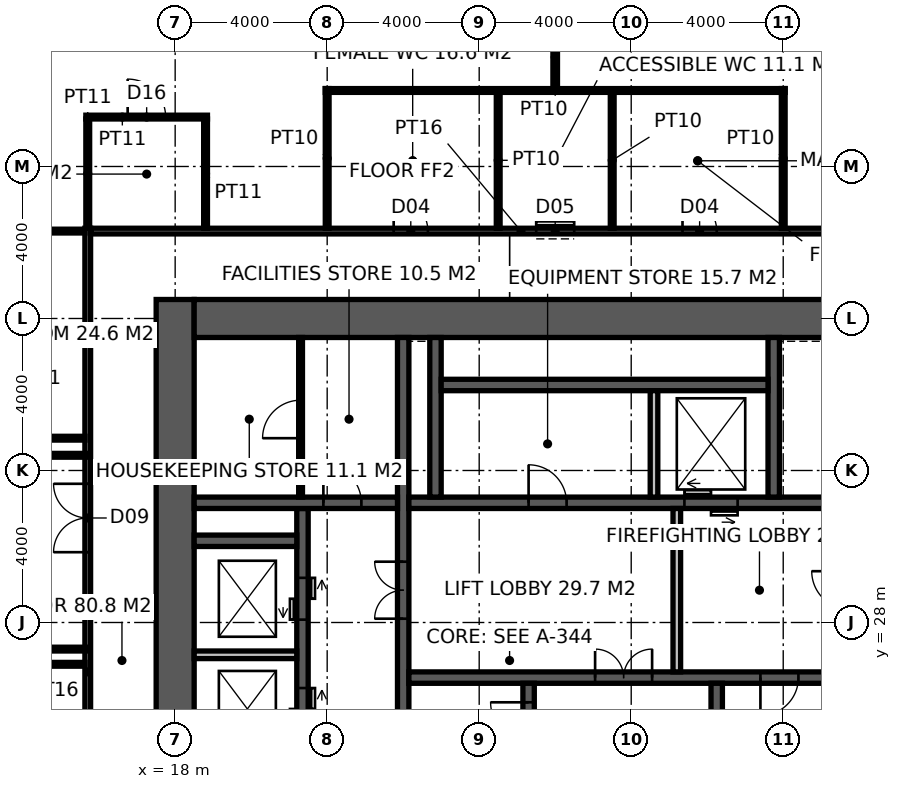
"""IFC4 building model, lengths in metres.
Left out: names, types, materials, properties, quantities, classifications, styles, units other than length and angle.
Written with IfcOpenShell. Run it as: python <this file> out.ifc"""

import sys

from ifc_helpers import new_model, si_unit, direction, frame, frame_2d, origin, place, context, subcontext, project, spatial, rectangle, extrude, element, fill, save


model = new_model("IFC4")
c1 = context("Model", 3, precision=1e-05, world=origin(), true_north=direction((0.0, 1.0)))
c2 = subcontext(c1, "Body", "Model", "MODEL_VIEW")
j1 = project(units=[si_unit("LENGTHUNIT", "METRE"), si_unit("PLANEANGLEUNIT", "RADIAN")], contexts=[c1])
p1 = place(None, origin())
s1 = spatial("IfcSite", under=j1, at=p1, CompositionType="ELEMENT")
p2 = place(p1, origin())
s2 = spatial("IfcBuilding", under=s1, at=p2, CompositionType="ELEMENT")
p3 = place(p2, frame((0.0, 0.0, 286.2)))
s3 = spatial("IfcBuildingStorey", under=s2, at=p3, CompositionType="ELEMENT", Elevation=286.2)
p4 = place(p3, frame((18.0, 17.5, -0.15), z_axis=(0.0, 0.0, 1.0), x_axis=(0.0, 1.0, 0.0)))
e1 = element("IfcWall", 1, at=p4, inside=s3, PredefinedType="SHEAR", context=c2, shape_type="SweptSolid", body=[
    extrude(rectangle(XDim=19.0, YDim=1.0, at=frame_2d((9.5, 0.0))), origin(), (0.0, 0.0, 1.0), 4.0),
])
p5 = place(p3, frame((18.5, 36.0, -0.15), z_axis=(0.0, 0.0, 1.0), x_axis=(1.0, 0.0, 0.0)))
e2 = element("IfcWall", 2, at=p5, inside=s3, PredefinedType="SHEAR", context=c2, shape_type="SweptSolid", body=[
    extrude(rectangle(XDim=17.6, YDim=1.0, at=frame_2d((8.8, 0.0))), origin(), (0.0, 0.0, 1.0), 4.0),
])
p6 = place(p3, frame((24.0, 18.5, -0.15), z_axis=(0.0, 0.0, 1.0), x_axis=(0.0, 1.0, 0.0)))
e3 = element("IfcWall", 3, at=p6, inside=s3, PredefinedType="SHEAR", context=c2, shape_type="SweptSolid", body=[
    extrude(rectangle(XDim=17.0, YDim=0.3, at=frame_2d((8.5, 0.0))), origin(), (0.0, 0.0, 1.0), 4.0),
])
p7 = place(p6, frame((9.6, 0.0, 0.15)))
e4 = element("IfcOpeningElement", 4, at=p7, cuts=e3, PredefinedType="OPENING", context=c2, shape_type="SweptSolid", body=[
    extrude(rectangle(XDim=1.5, YDim=2.4, at=frame_2d((0.75, 1.2))), frame((0.0, 0.16, 0.0), z_axis=(0.0, -1.0, 0.0), x_axis=(1.0, 0.0, 0.0)), (0.0, 0.0, 1.0), 0.32),
])
p8 = place(p3, frame((24.15, 26.55, -0.15), z_axis=(0.0, 0.0, 1.0), x_axis=(1.0, 0.0, 0.0)))
e5 = element("IfcWall", 5, at=p8, inside=s3, PredefinedType="SHEAR", context=c2, shape_type="SweptSolid", body=[
    extrude(rectangle(XDim=11.25, YDim=0.3, at=frame_2d((5.625, 0.0))), origin(), (0.0, 0.0, 1.0), 4.0),
])
p9 = place(p8, frame((9.25, 0.0, 0.15)))
e6 = element("IfcOpeningElement", 6, at=p9, cuts=e5, PredefinedType="OPENING", context=c2, shape_type="SweptSolid", body=[
    extrude(rectangle(XDim=1.0, YDim=2.2, at=frame_2d((0.5, 1.1))), frame((0.0, 0.16, 0.0), z_axis=(0.0, -1.0, 0.0), x_axis=(1.0, 0.0, 0.0)), (0.0, 0.0, 1.0), 0.32),
])
p10 = place(p8, frame((4.9, 0.0, 0.15)))
e7 = element("IfcOpeningElement", 7, at=p10, cuts=e5, PredefinedType="OPENING", context=c2, shape_type="SweptSolid", body=[
    extrude(rectangle(XDim=1.5, YDim=2.4, at=frame_2d((0.75, 1.2))), frame((0.0, 0.16, 0.0), z_axis=(0.0, -1.0, 0.0), x_axis=(1.0, 0.0, 0.0)), (0.0, 0.0, 1.0), 0.32),
])
p11 = place(p3, frame((27.3, 18.5, -0.15), z_axis=(0.0, 0.0, 1.0), x_axis=(0.0, 1.0, 0.0)))
e8 = element("IfcWall", 8, at=p11, inside=s3, PredefinedType="SHEAR", context=c2, shape_type="SweptSolid", body=[
    extrude(rectangle(XDim=7.9, YDim=0.3, at=frame_2d((3.95, 0.0))), origin(), (0.0, 0.0, 1.0), 4.0),
])
p12 = place(p11, frame((6.4, 0.0, 0.15)))
e9 = element("IfcOpeningElement", 9, at=p12, cuts=e8, PredefinedType="OPENING", context=c2, shape_type="SweptSolid", body=[
    extrude(rectangle(XDim=1.0, YDim=2.2, at=frame_2d((0.5, 1.1))), frame((0.0, 0.16, 0.0), z_axis=(0.0, -1.0, 0.0), x_axis=(1.0, 0.0, 0.0)), (0.0, 0.0, 1.0), 0.32),
])
p13 = place(p3, frame((32.25, 18.5, -0.15), z_axis=(0.0, 0.0, 1.0), x_axis=(0.0, 1.0, 0.0)))
e10 = element("IfcWall", 10, at=p13, inside=s3, PredefinedType="SHEAR", context=c2, shape_type="SweptSolid", body=[
    extrude(rectangle(XDim=7.9, YDim=0.3, at=frame_2d((3.95, 0.0))), origin(), (0.0, 0.0, 1.0), 4.0),
])
p14 = place(p3, frame((24.15, 31.15, -0.15), z_axis=(0.0, 0.0, 1.0), x_axis=(1.0, 0.0, 0.0)))
e11 = element("IfcWall", 11, at=p14, inside=s3, PredefinedType="SHEAR", context=c2, shape_type="SweptSolid", body=[
    extrude(rectangle(XDim=11.25, YDim=0.3, at=frame_2d((5.625, 0.0))), origin(), (0.0, 0.0, 1.0), 4.0),
])
p15 = place(p14, frame((3.15, 0.0, 0.15)))
e12 = element("IfcOpeningElement", 12, at=p15, cuts=e11, PredefinedType="OPENING", context=c2, shape_type="SweptSolid", body=[
    extrude(rectangle(XDim=1.0, YDim=2.2, at=frame_2d((0.5, 1.1))), frame((0.0, 0.16, 0.0), z_axis=(0.0, -1.0, 0.0), x_axis=(1.0, 0.0, 0.0)), (0.0, 0.0, 1.0), 0.32),
])
p16 = place(p14, frame((7.25, 0.0, 0.15)))
e13 = element("IfcOpeningElement", 13, at=p16, cuts=e11, PredefinedType="OPENING", context=c2, shape_type="SweptSolid", body=[
    extrude(rectangle(XDim=1.4, YDim=2.4, at=frame_2d((0.7, 1.2))), frame((0.0, 0.16, 0.0), z_axis=(0.0, -1.0, 0.0), x_axis=(1.0, 0.0, 0.0)), (0.0, 0.0, 1.0), 0.32),
])
p17 = place(p3, frame((21.35, 18.5, -0.15), z_axis=(0.0, 0.0, 1.0), x_axis=(0.0, 1.0, 0.0)))
e14 = element("IfcWall", 14, at=p17, inside=s3, PredefinedType="SHEAR", context=c2, shape_type="SweptSolid", body=[
    extrude(rectangle(XDim=12.5, YDim=0.3, at=frame_2d((6.25, 0.0))), origin(), (0.0, 0.0, 1.0), 4.0),
])
p18 = place(p17, frame((0.875, 0.0, 0.15)))
e15 = element("IfcOpeningElement", 15, at=p18, cuts=e14, PredefinedType="OPENING", context=c2, shape_type="SweptSolid", body=[
    extrude(rectangle(XDim=1.1, YDim=2.2, at=frame_2d((0.55, 1.1))), frame((0.0, 0.16, 0.0), z_axis=(0.0, -1.0, 0.0), x_axis=(1.0, 0.0, 0.0)), (0.0, 0.0, 1.0), 0.32),
])
p19 = place(p17, frame((3.825, 0.0, 0.15)))
e16 = element("IfcOpeningElement", 16, at=p19, cuts=e14, PredefinedType="OPENING", context=c2, shape_type="SweptSolid", body=[
    extrude(rectangle(XDim=1.1, YDim=2.2, at=frame_2d((0.55, 1.1))), frame((0.0, 0.16, 0.0), z_axis=(0.0, -1.0, 0.0), x_axis=(1.0, 0.0, 0.0)), (0.0, 0.0, 1.0), 0.32),
])
p20 = place(p17, frame((6.675, 0.0, 0.15)))
e17 = element("IfcOpeningElement", 17, at=p20, cuts=e14, PredefinedType="OPENING", context=c2, shape_type="SweptSolid", body=[
    extrude(rectangle(XDim=1.1, YDim=2.2, at=frame_2d((0.55, 1.1))), frame((0.0, 0.16, 0.0), z_axis=(0.0, -1.0, 0.0), x_axis=(1.0, 0.0, 0.0)), (0.0, 0.0, 1.0), 0.32),
])
p21 = place(p17, frame((9.575, 0.0, 0.15)))
e18 = element("IfcOpeningElement", 18, at=p21, cuts=e14, PredefinedType="OPENING", context=c2, shape_type="SweptSolid", body=[
    extrude(rectangle(XDim=1.1, YDim=2.2, at=frame_2d((0.55, 1.1))), frame((0.0, 0.16, 0.0), z_axis=(0.0, -1.0, 0.0), x_axis=(1.0, 0.0, 0.0)), (0.0, 0.0, 1.0), 0.32),
])
p22 = place(p3, frame((18.5, 31.15, -0.15), z_axis=(0.0, 0.0, 1.0), x_axis=(1.0, 0.0, 0.0)))
e19 = element("IfcWall", 19, at=p22, inside=s3, PredefinedType="SHEAR", context=c2, shape_type="SweptSolid", body=[
    extrude(rectangle(XDim=5.35, YDim=0.3, at=frame_2d((2.675, 0.0))), origin(), (0.0, 0.0, 1.0), 4.0),
])
p23 = place(p22, frame((3.4, 0.0, 0.15)))
e20 = element("IfcOpeningElement", 20, at=p23, cuts=e19, PredefinedType="OPENING", context=c2, shape_type="SweptSolid", body=[
    extrude(rectangle(XDim=1.0, YDim=2.2, at=frame_2d((0.5, 1.1))), frame((0.0, 0.16, 0.0), z_axis=(0.0, -1.0, 0.0), x_axis=(1.0, 0.0, 0.0)), (0.0, 0.0, 1.0), 0.32),
])
p24 = place(p3, frame((18.5, 30.15, -0.15), z_axis=(0.0, 0.0, 1.0), x_axis=(1.0, 0.0, 0.0)))
e21 = element("IfcWall", 21, at=p24, inside=s3, PredefinedType="SHEAR", context=c2, shape_type="SweptSolid", body=[
    extrude(rectangle(XDim=2.7, YDim=0.3, at=frame_2d((1.35, 0.0))), origin(), (0.0, 0.0, 1.0), 4.0),
])
for number, where, z_axis, x_axis in (
    (22, (24.85, 31.3, -0.15), (0.0, 0.0, 1.0), (0.0, 1.0, 0.0)),
    (23, (33.75, 31.3, -0.15), (0.0, 0.0, 1.0), (0.0, 1.0, 0.0)),
):
    element("IfcWall", number, at=place(p3, frame(where, z_axis=z_axis, x_axis=x_axis)), inside=s3, PredefinedType="SHEAR", context=c2, shape_type="SweptSolid", body=[
        extrude(rectangle(XDim=4.2, YDim=0.3, at=frame_2d((2.1, 0.0))), origin(), (0.0, 0.0, 1.0), 4.0),
    ])
p25 = place(p3, frame((25.0, 34.25, -0.15), z_axis=(0.0, 0.0, 1.0), x_axis=(1.0, 0.0, 0.0)))
e24 = element("IfcWall", 24, at=p25, inside=s3, PredefinedType="SHEAR", context=c2, shape_type="SweptSolid", body=[
    extrude(rectangle(XDim=8.6, YDim=0.3, at=frame_2d((4.3, 0.0))), origin(), (0.0, 0.0, 1.0), 4.0),
])
p26 = place(p3, frame((30.6, 31.3, -0.15), z_axis=(0.0, 0.0, 1.0), x_axis=(0.0, 1.0, 0.0)))
e25 = element("IfcWall", 25, at=p26, inside=s3, PredefinedType="SOLIDWALL", context=c2, shape_type="SweptSolid", body=[
    extrude(rectangle(XDim=2.8, YDim=0.2, at=frame_2d((1.4, 0.0))), origin(), (0.0, 0.0, 1.0), 4.0),
])
p27 = place(p3, frame((18.5, 27.15, -0.15), z_axis=(0.0, 0.0, 1.0), x_axis=(1.0, 0.0, 0.0)))
e26 = element("IfcWall", 26, at=p27, inside=s3, PredefinedType="SOLIDWALL", context=c2, shape_type="SweptSolid", body=[
    extrude(rectangle(XDim=2.7, YDim=0.2, at=frame_2d((1.35, 0.0))), origin(), (0.0, 0.0, 1.0), 4.0),
])
p28 = place(p3, frame((31.2, 26.7, 0.0), z_axis=(0.0, 0.0, 1.0), x_axis=(0.0, 1.0, 0.0)))
e27 = element("IfcWall", 27, at=p28, inside=s3, PredefinedType="SOLIDWALL", context=c2, shape_type="SweptSolid", body=[
    extrude(rectangle(XDim=4.3, YDim=0.2, at=frame_2d((2.15, 0.0))), origin(), (0.0, 0.0, 1.0), 3.85),
])
p29 = place(p3, frame((21.3, 31.3, 0.0), z_axis=(0.0, 0.0, 1.0), x_axis=(0.0, 1.0, 0.0)))
e28 = element("IfcWall", 28, at=p29, inside=s3, PredefinedType="PARTITIONING", context=c2, shape_type="SweptSolid", body=[
    extrude(rectangle(XDim=4.2, YDim=0.1, at=frame_2d((2.1, 0.0))), origin(), (0.0, 0.0, 1.0), 3.85),
])
p30 = place(p29, frame((1.55, 0.0, 0.0)))
e29 = element("IfcOpeningElement", 29, at=p30, cuts=e28, PredefinedType="OPENING", context=c2, shape_type="SweptSolid", body=[
    extrude(rectangle(XDim=1.0, YDim=2.2, at=frame_2d((0.5, 1.1))), frame((0.0, 0.06, 0.0), z_axis=(0.0, -1.0, 0.0), x_axis=(1.0, 0.0, 0.0)), (0.0, 0.0, 1.0), 0.12),
])
p31 = place(p3, frame((15.7, 15.025, 0.0), z_axis=(0.0, 0.0, 1.0), x_axis=(0.0, 1.0, 0.0)))
e30 = element("IfcWall", 30, at=p31, inside=s3, PredefinedType="PARTITIONING", context=c2, shape_type="SweptSolid", body=[
    extrude(rectangle(XDim=23.35, YDim=0.15, at=frame_2d((11.675, 0.0))), origin(), (0.0, 0.0, 1.0), 3.85),
])
p32 = place(p31, frame((3.275, 0.0, 0.0)))
e31 = element("IfcOpeningElement", 31, at=p32, cuts=e30, PredefinedType="OPENING", context=c2, shape_type="SweptSolid", body=[
    extrude(rectangle(XDim=1.8, YDim=2.4, at=frame_2d((0.9, 1.2))), frame((0.0, 0.085, 0.0), z_axis=(0.0, -1.0, 0.0), x_axis=(1.0, 0.0, 0.0)), (0.0, 0.0, 1.0), 0.17),
])
p33 = place(p31, frame((14.825, 0.0, 0.0)))
e32 = element("IfcOpeningElement", 32, at=p33, cuts=e30, PredefinedType="OPENING", context=c2, shape_type="SweptSolid", body=[
    extrude(rectangle(XDim=1.8, YDim=2.4, at=frame_2d((0.9, 1.2))), frame((0.0, 0.085, 0.0), z_axis=(0.0, -1.0, 0.0), x_axis=(1.0, 0.0, 0.0)), (0.0, 0.0, 1.0), 0.17),
])
p34 = place(p3, frame((15.775, 38.3, 0.0), z_axis=(0.0, 0.0, 1.0), x_axis=(1.0, 0.0, 0.0)))
e33 = element("IfcWall", 33, at=p34, inside=s3, PredefinedType="PARTITIONING", context=c2, shape_type="SweptSolid", body=[
    extrude(rectangle(XDim=22.65, YDim=0.15, at=frame_2d((11.325, 0.0))), origin(), (0.0, 0.0, 1.0), 3.85),
])
p35 = place(p34, frame((7.975, 0.0, 0.0)))
e34 = element("IfcOpeningElement", 34, at=p35, cuts=e33, PredefinedType="OPENING", context=c2, shape_type="SweptSolid", body=[
    extrude(rectangle(XDim=0.9, YDim=2.1, at=frame_2d((0.45, 1.05))), frame((0.0, 0.085, 0.0), z_axis=(0.0, -1.0, 0.0), x_axis=(1.0, 0.0, 0.0)), (0.0, 0.0, 1.0), 0.17),
])
p36 = place(p34, frame((11.725, 0.0, 0.0)))
e35 = element("IfcOpeningElement", 35, at=p36, cuts=e33, PredefinedType="OPENING", context=c2, shape_type="SweptSolid", body=[
    extrude(rectangle(XDim=1.0, YDim=2.1, at=frame_2d((0.5, 1.05))), frame((0.0, 0.085, 0.0), z_axis=(0.0, -1.0, 0.0), x_axis=(1.0, 0.0, 0.0)), (0.0, 0.0, 1.0), 0.17),
])
p37 = place(p34, frame((15.575, 0.0, 0.0)))
e36 = element("IfcOpeningElement", 36, at=p37, cuts=e33, PredefinedType="OPENING", context=c2, shape_type="SweptSolid", body=[
    extrude(rectangle(XDim=0.9, YDim=2.1, at=frame_2d((0.45, 1.05))), frame((0.0, 0.085, 0.0), z_axis=(0.0, -1.0, 0.0), x_axis=(1.0, 0.0, 0.0)), (0.0, 0.0, 1.0), 0.17),
])
for number, where, z_axis, x_axis in (
    (37, (22.0, 38.375, 0.0), (0.0, 0.0, 1.0), (0.0, 1.0, 0.0)),
    (38, (34.0, 38.375, 0.0), (0.0, 0.0, 1.0), (0.0, 1.0, 0.0)),
):
    element("IfcWall", number, at=place(p3, frame(where, z_axis=z_axis, x_axis=x_axis)), inside=s3, PredefinedType="PARTITIONING", context=c2, shape_type="SweptSolid", body=[
        extrude(rectangle(XDim=3.675, YDim=0.1, at=frame_2d((1.837, 0.0))), origin(), (0.0, 0.0, 1.0), 2.95),
    ])
p38 = place(p3, frame((21.95, 42.0, 0.0), z_axis=(0.0, 0.0, 1.0), x_axis=(1.0, 0.0, 0.0)))
e39 = element("IfcWall", 39, at=p38, inside=s3, PredefinedType="PARTITIONING", context=c2, shape_type="SweptSolid", body=[
    extrude(rectangle(XDim=12.1, YDim=0.1, at=frame_2d((6.05, 0.0))), origin(), (0.0, 0.0, 1.0), 3.85),
])
for number, where, z_axis, x_axis in (
    (40, (26.5, 38.375, 0.0), (0.0, 0.0, 1.0), (0.0, 1.0, 0.0)),
    (41, (29.5, 38.375, 0.0), (0.0, 0.0, 1.0), (0.0, 1.0, 0.0)),
):
    element("IfcWall", number, at=place(p3, frame(where, z_axis=z_axis, x_axis=x_axis)), inside=s3, PredefinedType="PARTITIONING", context=c2, shape_type="SweptSolid", body=[
        extrude(rectangle(XDim=3.575, YDim=0.1, at=frame_2d((1.788, 0.0))), origin(), (0.0, 0.0, 1.0), 3.85),
    ])
p39 = place(p3, frame((28.0, 42.05, 0.0), z_axis=(0.0, 0.0, 1.0), x_axis=(0.0, 1.0, 0.0)))
e42 = element("IfcWall", 42, at=p39, inside=s3, PredefinedType="PARTITIONING", context=c2, shape_type="SweptSolid", body=[
    extrude(rectangle(XDim=1.65, YDim=0.12, at=frame_2d((0.825, 0.0))), origin(), (0.0, 0.0, 1.0), 3.85),
])
for number, where, z_axis, x_axis in (
    (43, (10.85, 26.9, 0.0), (0.0, 0.0, 1.0), (1.0, 0.0, 0.0)),
    (44, (10.85, 32.85, 0.0), (0.0, 0.0, 1.0), (1.0, 0.0, 0.0)),
    (45, (10.85, 38.3, 0.0), (0.0, 0.0, 1.0), (1.0, 0.0, 0.0)),
):
    element("IfcWall", number, at=place(p3, frame(where, z_axis=z_axis, x_axis=x_axis)), inside=s3, PredefinedType="PARTITIONING", context=c2, shape_type="SweptSolid", body=[
        extrude(rectangle(XDim=4.775, YDim=0.1, at=frame_2d((2.387, 0.0))), origin(), (0.0, 0.0, 1.0), 3.85),
    ])
p40 = place(p3, frame((15.65, 41.3, 0.0), z_axis=(0.0, 0.0, 1.0), x_axis=(1.0, 0.0, 0.0)))
e46 = element("IfcWall", 46, at=p40, inside=s3, PredefinedType="PARTITIONING", context=c2, shape_type="SweptSolid", body=[
    extrude(rectangle(XDim=3.2, YDim=0.1, at=frame_2d((1.6, 0.0))), origin(), (0.0, 0.0, 1.0), 3.85),
])
p41 = place(p40, frame((1.1, 0.0, 0.0)))
e47 = element("IfcOpeningElement", 47, at=p41, cuts=e46, PredefinedType="OPENING", context=c2, shape_type="SweptSolid", body=[
    extrude(rectangle(XDim=1.0, YDim=2.2, at=frame_2d((0.5, 1.1))), frame((0.0, 0.06, 0.0), z_axis=(0.0, -1.0, 0.0), x_axis=(1.0, 0.0, 0.0)), (0.0, 0.0, 1.0), 0.12),
])
for number, where, z_axis, x_axis in (
    (48, (15.7, 38.375, 0.0), (0.0, 0.0, 1.0), (0.0, 1.0, 0.0)),
    (49, (18.8, 38.375, 0.0), (0.0, 0.0, 1.0), (0.0, 1.0, 0.0)),
):
    element("IfcWall", number, at=place(p3, frame(where, z_axis=z_axis, x_axis=x_axis)), inside=s3, PredefinedType="PARTITIONING", context=c2, shape_type="SweptSolid", body=[
        extrude(rectangle(XDim=2.875, YDim=0.1, at=frame_2d((1.438, 0.0))), origin(), (0.0, 0.0, 1.0), 3.85),
    ])
for number, where, z_axis, x_axis in (
    (50, (15.7, 32.4, 0.0), (0.0, 0.0, 1.0), (-1.0, 0.0, 0.0)),
    (51, (11.2, 27.3, 0.0), (0.0, 0.0, 1.0), (1.0, 0.0, 0.0)),
):
    element("IfcWall", number, at=place(p3, frame(where, z_axis=z_axis, x_axis=x_axis)), inside=s3, PredefinedType="PARTITIONING", context=c2, shape_type="SweptSolid", body=[
        extrude(rectangle(XDim=4.5, YDim=0.1, at=frame_2d((2.25, 0.0))), origin(), (0.0, 0.0, 1.0), 3.85),
    ])
p42 = place(p12, origin())
e52 = element("IfcDoor", 52, at=p42, inside=s3, OperationType="SINGLE_SWING_RIGHT", PredefinedType="DOOR", context=c2, shape_type="SweptSolid", body=[
    extrude(rectangle(XDim=1.0, YDim=2.2, at=frame_2d((0.5, 1.1))), frame((0.0, 0.025, 0.0), z_axis=(0.0, -1.0, 0.0), x_axis=(1.0, 0.0, 0.0)), (0.0, 0.0, 1.0), 0.05),
])
fill(e9, e52)
p43 = place(p9, frame((1.0, 0.0, 0.0), z_axis=(0.0, 0.0, 1.0), x_axis=(-1.0, 0.0, 0.0)))
e53 = element("IfcDoor", 53, at=p43, inside=s3, OperationType="SINGLE_SWING_RIGHT", PredefinedType="DOOR", context=c2, shape_type="SweptSolid", body=[
    extrude(rectangle(XDim=1.0, YDim=2.2, at=frame_2d((0.5, 1.1))), frame((0.0, 0.025, 0.0), z_axis=(0.0, -1.0, 0.0), x_axis=(1.0, 0.0, 0.0)), (0.0, 0.0, 1.0), 0.05),
])
fill(e6, e53)
p44 = place(p10, origin())
e54 = element("IfcDoor", 54, at=p44, inside=s3, OperationType="DOUBLE_DOOR_DOUBLE_SWING", PredefinedType="DOOR", context=c2, shape_type="SweptSolid", body=[
    extrude(rectangle(XDim=1.5, YDim=2.4, at=frame_2d((0.75, 1.2))), frame((0.0, 0.025, 0.0), z_axis=(0.0, -1.0, 0.0), x_axis=(1.0, 0.0, 0.0)), (0.0, 0.0, 1.0), 0.05),
])
fill(e7, e54)
p45 = place(p7, origin())
e55 = element("IfcDoor", 55, at=p45, inside=s3, OperationType="DOUBLE_DOOR_DOUBLE_SWING", PredefinedType="DOOR", context=c2, shape_type="SweptSolid", body=[
    extrude(rectangle(XDim=1.5, YDim=2.4, at=frame_2d((0.75, 1.2))), frame((0.0, 0.025, 0.0), z_axis=(0.0, -1.0, 0.0), x_axis=(1.0, 0.0, 0.0)), (0.0, 0.0, 1.0), 0.05),
])
fill(e4, e55)
p46 = place(p23, origin())
e56 = element("IfcDoor", 56, at=p46, inside=s3, OperationType="SINGLE_SWING_LEFT", PredefinedType="DOOR", context=c2, shape_type="SweptSolid", body=[
    extrude(rectangle(XDim=1.0, YDim=2.2, at=frame_2d((0.5, 1.1))), frame((0.0, 0.025, 0.0), z_axis=(0.0, -1.0, 0.0), x_axis=(1.0, 0.0, 0.0)), (0.0, 0.0, 1.0), 0.05),
])
fill(e20, e56)
p47 = place(p30, origin())
e57 = element("IfcDoor", 57, at=p47, inside=s3, OperationType="SINGLE_SWING_LEFT", PredefinedType="DOOR", context=c2, shape_type="SweptSolid", body=[
    extrude(rectangle(XDim=1.0, YDim=2.2, at=frame_2d((0.5, 1.1))), frame((0.0, 0.025, 0.0), z_axis=(0.0, -1.0, 0.0), x_axis=(1.0, 0.0, 0.0)), (0.0, 0.0, 1.0), 0.05),
])
fill(e29, e57)
p48 = place(p15, origin())
e58 = element("IfcDoor", 58, at=p48, inside=s3, OperationType="SINGLE_SWING_LEFT", PredefinedType="DOOR", context=c2, shape_type="SweptSolid", body=[
    extrude(rectangle(XDim=1.0, YDim=2.2, at=frame_2d((0.5, 1.1))), frame((0.0, 0.025, 0.0), z_axis=(0.0, -1.0, 0.0), x_axis=(1.0, 0.0, 0.0)), (0.0, 0.0, 1.0), 0.05),
])
fill(e12, e58)
p49 = place(p35, origin())
e59 = element("IfcDoor", 59, at=p49, inside=s3, OperationType="SINGLE_SWING_LEFT", PredefinedType="DOOR", context=c2, shape_type="SweptSolid", body=[
    extrude(rectangle(XDim=0.9, YDim=2.1, at=frame_2d((0.45, 1.05))), frame((0.0, 0.025, 0.0), z_axis=(0.0, -1.0, 0.0), x_axis=(1.0, 0.0, 0.0)), (0.0, 0.0, 1.0), 0.05),
])
fill(e34, e59)
p50 = place(p36, origin())
e60 = element("IfcDoor", 60, at=p50, inside=s3, OperationType="SLIDING_TO_LEFT", PredefinedType="DOOR", context=c2, shape_type="SweptSolid", body=[
    extrude(rectangle(XDim=1.0, YDim=2.1, at=frame_2d((0.5, 1.05))), frame((0.0, 0.025, 0.0), z_axis=(0.0, -1.0, 0.0), x_axis=(1.0, 0.0, 0.0)), (0.0, 0.0, 1.0), 0.05),
])
fill(e35, e60)
p51 = place(p37, origin())
e61 = element("IfcDoor", 61, at=p51, inside=s3, OperationType="SINGLE_SWING_LEFT", PredefinedType="DOOR", context=c2, shape_type="SweptSolid", body=[
    extrude(rectangle(XDim=0.9, YDim=2.1, at=frame_2d((0.45, 1.05))), frame((0.0, 0.025, 0.0), z_axis=(0.0, -1.0, 0.0), x_axis=(1.0, 0.0, 0.0)), (0.0, 0.0, 1.0), 0.05),
])
fill(e36, e61)
p52 = place(p33, origin())
e62 = element("IfcDoor", 62, at=p52, inside=s3, OperationType="DOUBLE_DOOR_DOUBLE_SWING", PredefinedType="DOOR", context=c2, shape_type="SweptSolid", body=[
    extrude(rectangle(XDim=1.8, YDim=2.4, at=frame_2d((0.9, 1.2))), frame((0.0, 0.025, 0.0), z_axis=(0.0, -1.0, 0.0), x_axis=(1.0, 0.0, 0.0)), (0.0, 0.0, 1.0), 0.05),
])
fill(e32, e62)
p53 = place(p41, origin())
e63 = element("IfcDoor", 63, at=p53, inside=s3, OperationType="SINGLE_SWING_LEFT", PredefinedType="DOOR", context=c2, shape_type="SweptSolid", body=[
    extrude(rectangle(XDim=1.0, YDim=2.2, at=frame_2d((0.5, 1.1))), frame((0.0, 0.025, 0.0), z_axis=(0.0, -1.0, 0.0), x_axis=(1.0, 0.0, 0.0)), (0.0, 0.0, 1.0), 0.05),
])
fill(e47, e63)
p54 = place(p16, origin())
e64 = element("IfcDoor", 64, at=p54, inside=s3, OperationType="DOUBLE_DOOR_SLIDING", PredefinedType="DOOR", context=c2, shape_type="SweptSolid", body=[
    extrude(rectangle(XDim=1.4, YDim=2.4, at=frame_2d((0.7, 1.2))), frame((0.0, 0.025, 0.0), z_axis=(0.0, -1.0, 0.0), x_axis=(1.0, 0.0, 0.0)), (0.0, 0.0, 1.0), 0.05),
])
fill(e13, e64)
p55 = place(p20, origin())
e65 = element("IfcDoor", 65, at=p55, inside=s3, OperationType="DOUBLE_DOOR_SLIDING", PredefinedType="DOOR", context=c2, shape_type="SweptSolid", body=[
    extrude(rectangle(XDim=1.1, YDim=2.2, at=frame_2d((0.55, 1.1))), frame((0.0, 0.025, 0.0), z_axis=(0.0, -1.0, 0.0), x_axis=(1.0, 0.0, 0.0)), (0.0, 0.0, 1.0), 0.05),
])
fill(e17, e65)
p56 = place(p21, origin())
e66 = element("IfcDoor", 66, at=p56, inside=s3, OperationType="DOUBLE_DOOR_SLIDING", PredefinedType="DOOR", context=c2, shape_type="SweptSolid", body=[
    extrude(rectangle(XDim=1.1, YDim=2.2, at=frame_2d((0.55, 1.1))), frame((0.0, 0.025, 0.0), z_axis=(0.0, -1.0, 0.0), x_axis=(1.0, 0.0, 0.0)), (0.0, 0.0, 1.0), 0.05),
])
fill(e18, e66)
save(model, sys.argv[1])
